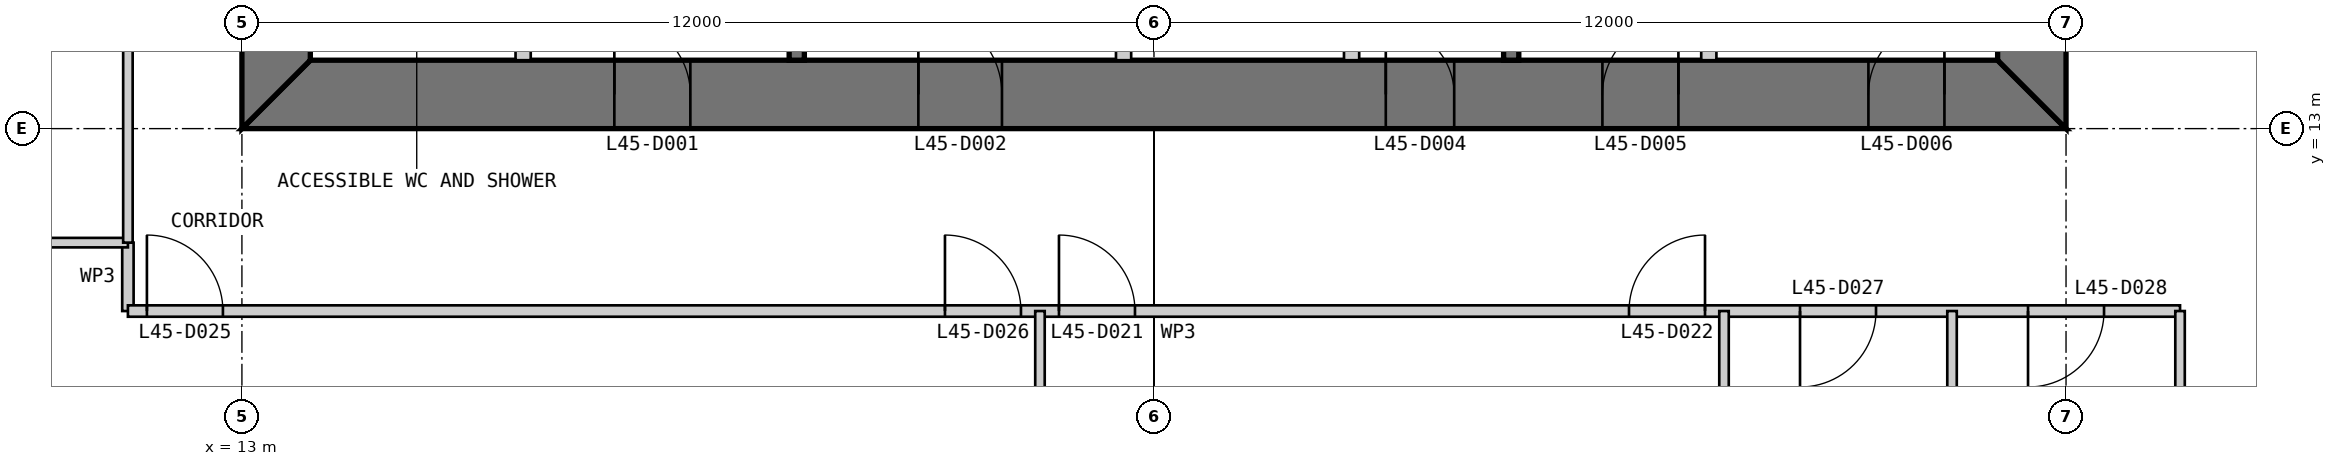
"""IFC4 building model, lengths in metres.
Left out: names, types, materials, properties, quantities, classifications, styles, units other than length and angle.
Written with IfcOpenShell. Run it as: python <this file> out.ifc"""

import sys

from ifc_helpers import new_model, si_unit, direction, frame, frame_2d, origin, place, context, subcontext, project, spatial, polyline, rectangle, outline, extrude, element, fill, save


model = new_model("IFC4")
c1 = context("Model", 3, precision=1e-05, world=origin(), true_north=direction((0.0, 1.0)))
c2 = subcontext(c1, "Body", "Model", "MODEL_VIEW")
j1 = project(units=[si_unit("LENGTHUNIT", "METRE"), si_unit("PLANEANGLEUNIT", "RADIAN")], contexts=[c1])
p1 = place(None, origin())
s1 = spatial("IfcSite", under=j1, at=p1, CompositionType="ELEMENT")
p2 = place(p1, origin())
s2 = spatial("IfcBuilding", under=s1, at=p2, CompositionType="ELEMENT")
p3 = place(p2, frame((0.0, 0.0, 193.8)))
s3 = spatial("IfcBuildingStorey", under=s2, at=p3, CompositionType="ELEMENT", Elevation=193.8)
p4 = place(p3, frame((13.0, 13.45, 0.0), z_axis=(0.0, 0.0, 1.0), x_axis=(1.0, 0.0, 0.0)))
e1 = element("IfcWall", 1, at=p4, inside=s3, PredefinedType="SHEAR", context=c2, shape_type="SweptSolid", body=[
    extrude(outline(polyline([(0.0, -0.45), (24.0, -0.45), (23.1, 0.45), (0.9, 0.45), (0.0, -0.45)])), origin(), (0.0, 0.0, 1.0), 4.0),
])
p5 = place(p4, frame((4.9, 0.0, 0.0)))
e2 = element("IfcOpeningElement", 2, at=p5, cuts=e1, PredefinedType="OPENING", context=c2, shape_type="SweptSolid", body=[
    extrude(rectangle(XDim=1.0, YDim=2.2, at=frame_2d((0.5, 1.1))), frame((0.0, 0.46, 0.0), z_axis=(0.0, -1.0, 0.0), x_axis=(1.0, 0.0, 0.0)), (0.0, 0.0, 1.0), 0.92),
])
p6 = place(p4, frame((8.9, 0.0, 0.0)))
e3 = element("IfcOpeningElement", 3, at=p6, cuts=e1, PredefinedType="OPENING", context=c2, shape_type="SweptSolid", body=[
    extrude(rectangle(XDim=1.1, YDim=2.2, at=frame_2d((0.55, 1.1))), frame((0.0, 0.46, 0.0), z_axis=(0.0, -1.0, 0.0), x_axis=(1.0, 0.0, 0.0)), (0.0, 0.0, 1.0), 0.92),
])
p7 = place(p4, frame((15.05, 0.0, 0.0)))
e4 = element("IfcOpeningElement", 4, at=p7, cuts=e1, PredefinedType="OPENING", context=c2, shape_type="SweptSolid", body=[
    extrude(rectangle(XDim=0.9, YDim=2.2, at=frame_2d((0.45, 1.1))), frame((0.0, 0.46, 0.0), z_axis=(0.0, -1.0, 0.0), x_axis=(1.0, 0.0, 0.0)), (0.0, 0.0, 1.0), 0.92),
])
p8 = place(p4, frame((17.9, 0.0, 0.0)))
e5 = element("IfcOpeningElement", 5, at=p8, cuts=e1, PredefinedType="OPENING", context=c2, shape_type="SweptSolid", body=[
    extrude(rectangle(XDim=1.0, YDim=2.2, at=frame_2d((0.5, 1.1))), frame((0.0, 0.46, 0.0), z_axis=(0.0, -1.0, 0.0), x_axis=(1.0, 0.0, 0.0)), (0.0, 0.0, 1.0), 0.92),
])
p9 = place(p4, frame((21.4, 0.0, 0.0)))
e6 = element("IfcOpeningElement", 6, at=p9, cuts=e1, PredefinedType="OPENING", context=c2, shape_type="SweptSolid", body=[
    extrude(rectangle(XDim=1.0, YDim=2.2, at=frame_2d((0.5, 1.1))), frame((0.0, 0.46, 0.0), z_axis=(0.0, -1.0, 0.0), x_axis=(1.0, 0.0, 0.0)), (0.0, 0.0, 1.0), 0.92),
])
p10 = place(p3, frame((36.55, 13.9, 0.0), z_axis=(0.0, 0.0, 1.0), x_axis=(0.0, 1.0, 0.0)))
e7 = element("IfcWall", 7, at=p10, inside=s3, PredefinedType="SHEAR", context=c2, shape_type="SweptSolid", body=[
    extrude(outline(polyline([(-0.9, -0.45), (23.1, -0.45), (22.2, 0.45), (0.0, 0.45), (-0.9, -0.45)])), origin(), (0.0, 0.0, 1.0), 4.0),
])
p11 = place(p10, frame((20.2, 0.0, 0.0)))
e8 = element("IfcOpeningElement", 8, at=p11, cuts=e7, PredefinedType="OPENING", context=c2, shape_type="SweptSolid", body=[
    extrude(rectangle(XDim=1.0, YDim=2.2, at=frame_2d((0.5, 1.1))), frame((0.0, 0.46, 0.0), z_axis=(0.0, -1.0, 0.0), x_axis=(1.0, 0.0, 0.0)), (0.0, 0.0, 1.0), 0.92),
])
p12 = place(p10, frame((17.25, 0.0, 0.0)))
e9 = element("IfcOpeningElement", 9, at=p12, cuts=e7, PredefinedType="OPENING", context=c2, shape_type="SweptSolid", body=[
    extrude(rectangle(XDim=0.9, YDim=2.2, at=frame_2d((0.45, 1.1))), frame((0.0, 0.46, 0.0), z_axis=(0.0, -1.0, 0.0), x_axis=(1.0, 0.0, 0.0)), (0.0, 0.0, 1.0), 0.92),
])
p13 = place(p3, frame((13.45, 36.1, 0.0), z_axis=(0.0, 0.0, 1.0), x_axis=(0.0, -1.0, 0.0)))
e10 = element("IfcWall", 10, at=p13, inside=s3, PredefinedType="SHEAR", context=c2, shape_type="SweptSolid", body=[
    extrude(outline(polyline([(-0.9, -0.45), (23.1, -0.45), (22.2, 0.45), (0.0, 0.45), (-0.9, -0.45)])), origin(), (0.0, 0.0, 1.0), 4.0),
])
p14 = place(p13, frame((20.2, 0.0, 0.0)))
e11 = element("IfcOpeningElement", 11, at=p14, cuts=e10, PredefinedType="OPENING", context=c2, shape_type="SweptSolid", body=[
    extrude(rectangle(XDim=1.0, YDim=2.2, at=frame_2d((0.5, 1.1))), frame((0.0, 0.46, 0.0), z_axis=(0.0, -1.0, 0.0), x_axis=(1.0, 0.0, 0.0)), (0.0, 0.0, 1.0), 0.92),
])
p15 = place(p13, frame((17.25, 0.0, 0.0)))
e12 = element("IfcOpeningElement", 12, at=p15, cuts=e10, PredefinedType="OPENING", context=c2, shape_type="SweptSolid", body=[
    extrude(rectangle(XDim=0.9, YDim=2.2, at=frame_2d((0.45, 1.1))), frame((0.0, 0.46, 0.0), z_axis=(0.0, -1.0, 0.0), x_axis=(1.0, 0.0, 0.0)), (0.0, 0.0, 1.0), 0.92),
])
p16 = place(p3, frame((16.7, 13.9, 0.0), z_axis=(0.0, 0.0, 1.0), x_axis=(0.0, 1.0, 0.0)))
e13 = element("IfcWall", 13, at=p16, inside=s3, PredefinedType="PARTITIONING", context=c2, shape_type="SweptSolid", body=[
    extrude(rectangle(XDim=16.1, YDim=0.2, at=frame_2d((8.05, 0.0))), origin(), (0.0, 0.0, 1.0), 3.8),
])
p17 = place(p16, frame((13.4, 0.0, 0.0)))
e14 = element("IfcOpeningElement", 14, at=p17, cuts=e13, PredefinedType="OPENING", context=c2, shape_type="SweptSolid", body=[
    extrude(rectangle(XDim=0.9, YDim=2.2, at=frame_2d((0.45, 1.1))), frame((0.0, 0.11, 0.0), z_axis=(0.0, -1.0, 0.0), x_axis=(1.0, 0.0, 0.0)), (0.0, 0.0, 1.0), 0.22),
])
p18 = place(p3, frame((20.3, 13.9, 0.0), z_axis=(0.0, 0.0, 1.0), x_axis=(0.0, 1.0, 0.0)))
e15 = element("IfcWall", 15, at=p18, inside=s3, PredefinedType="SOLIDWALL", context=c2, shape_type="SweptSolid", body=[
    extrude(rectangle(XDim=16.1, YDim=0.2, at=frame_2d((8.05, 0.0))), origin(), (0.0, 0.0, 1.0), 3.8),
])
p19 = place(p18, frame((8.4, 0.0, 0.0)))
e16 = element("IfcOpeningElement", 16, at=p19, cuts=e15, PredefinedType="OPENING", context=c2, shape_type="SweptSolid", body=[
    extrude(rectangle(XDim=0.9, YDim=2.2, at=frame_2d((0.45, 1.1))), frame((0.0, 0.11, 0.0), z_axis=(0.0, -1.0, 0.0), x_axis=(1.0, 0.0, 0.0)), (0.0, 0.0, 1.0), 0.22),
])
p20 = place(p18, frame((13.4, 0.0, 0.0)))
e17 = element("IfcOpeningElement", 17, at=p20, cuts=e15, PredefinedType="OPENING", context=c2, shape_type="SweptSolid", body=[
    extrude(rectangle(XDim=0.9, YDim=2.2, at=frame_2d((0.45, 1.1))), frame((0.0, 0.11, 0.0), z_axis=(0.0, -1.0, 0.0), x_axis=(1.0, 0.0, 0.0)), (0.0, 0.0, 1.0), 0.22),
])
p21 = place(p3, frame((24.6, 13.9, 0.0), z_axis=(0.0, 0.0, 1.0), x_axis=(0.0, 1.0, 0.0)))
e18 = element("IfcWall", 18, at=p21, inside=s3, PredefinedType="PARTITIONING", context=c2, shape_type="SweptSolid", body=[
    extrude(rectangle(XDim=3.3, YDim=0.2, at=frame_2d((1.65, 0.0))), origin(), (0.0, 0.0, 1.0), 3.8),
])
p22 = place(p21, frame((0.9, 0.0, 0.0)))
e19 = element("IfcOpeningElement", 19, at=p22, cuts=e18, PredefinedType="OPENING", context=c2, shape_type="SweptSolid", body=[
    extrude(rectangle(XDim=1.1, YDim=2.2, at=frame_2d((0.55, 1.1))), frame((0.0, 0.11, 0.0), z_axis=(0.0, -1.0, 0.0), x_axis=(1.0, 0.0, 0.0)), (0.0, 0.0, 1.0), 0.22),
])
p23 = place(p3, frame((27.6, 13.9, 0.0), z_axis=(0.0, 0.0, 1.0), x_axis=(0.0, 1.0, 0.0)))
e20 = element("IfcWall", 20, at=p23, inside=s3, PredefinedType="PARTITIONING", context=c2, shape_type="SweptSolid", body=[
    extrude(rectangle(XDim=3.3, YDim=0.2, at=frame_2d((1.65, 0.0))), origin(), (0.0, 0.0, 1.0), 3.8),
])
p24 = place(p3, frame((29.7, 13.9, 0.0), z_axis=(0.0, 0.0, 1.0), x_axis=(0.0, 1.0, 0.0)))
e21 = element("IfcWall", 21, at=p24, inside=s3, PredefinedType="SOLIDWALL", context=c2, shape_type="SweptSolid", body=[
    extrude(rectangle(XDim=6.1, YDim=0.2, at=frame_2d((3.05, 0.0))), origin(), (0.0, 0.0, 1.0), 3.8),
])
p25 = place(p3, frame((32.3, 13.9, 0.0), z_axis=(0.0, 0.0, 1.0), x_axis=(0.0, 1.0, 0.0)))
e22 = element("IfcWall", 22, at=p25, inside=s3, PredefinedType="PARTITIONING", context=c2, shape_type="SweptSolid", body=[
    extrude(rectangle(XDim=6.1, YDim=0.2, at=frame_2d((3.05, 0.0))), origin(), (0.0, 0.0, 1.0), 3.8),
])
p26 = place(p3, frame((11.5, 11.5, 0.0), z_axis=(0.0, 0.0, 1.0), x_axis=(0.0, -1.0, 0.0)))
e23 = element("IfcWall", 23, at=p26, inside=s3, PredefinedType="PARTITIONING", context=c2, shape_type="SweptSolid", body=[
    extrude(rectangle(XDim=0.9, YDim=0.15, at=frame_2d((0.45, 0.0))), origin(), (0.0, 0.0, 1.0), 3.85),
])
p27 = place(p3, frame((11.5, 10.6, 0.0), z_axis=(0.0, 0.0, 1.0), x_axis=(1.0, 0.0, 0.0)))
e24 = element("IfcWall", 24, at=p27, inside=s3, PredefinedType="PARTITIONING", context=c2, shape_type="SweptSolid", body=[
    extrude(rectangle(XDim=27.0, YDim=0.15, at=frame_2d((13.5, 0.0))), origin(), (0.0, 0.0, 1.0), 3.85),
])
p28 = place(p27, frame((12.25, 0.0, 0.0)))
e25 = element("IfcOpeningElement", 25, at=p28, cuts=e24, PredefinedType="OPENING", context=c2, shape_type="SweptSolid", body=[
    extrude(rectangle(XDim=1.0, YDim=2.2, at=frame_2d((0.5, 1.1))), frame((0.0, 0.085, 0.0), z_axis=(0.0, -1.0, 0.0), x_axis=(1.0, 0.0, 0.0)), (0.0, 0.0, 1.0), 0.17),
])
p29 = place(p27, frame((19.75, 0.0, 0.0)))
e26 = element("IfcOpeningElement", 26, at=p29, cuts=e24, PredefinedType="OPENING", context=c2, shape_type="SweptSolid", body=[
    extrude(rectangle(XDim=1.0, YDim=2.2, at=frame_2d((0.5, 1.1))), frame((0.0, 0.085, 0.0), z_axis=(0.0, -1.0, 0.0), x_axis=(1.0, 0.0, 0.0)), (0.0, 0.0, 1.0), 0.17),
])
p30 = place(p27, frame((0.25, 0.0, 0.0)))
e27 = element("IfcOpeningElement", 27, at=p30, cuts=e24, PredefinedType="OPENING", context=c2, shape_type="SweptSolid", body=[
    extrude(rectangle(XDim=1.0, YDim=2.2, at=frame_2d((0.5, 1.1))), frame((0.0, 0.085, 0.0), z_axis=(0.0, -1.0, 0.0), x_axis=(1.0, 0.0, 0.0)), (0.0, 0.0, 1.0), 0.17),
])
p31 = place(p27, frame((10.75, 0.0, 0.0)))
e28 = element("IfcOpeningElement", 28, at=p31, cuts=e24, PredefinedType="OPENING", context=c2, shape_type="SweptSolid", body=[
    extrude(rectangle(XDim=1.0, YDim=2.2, at=frame_2d((0.5, 1.1))), frame((0.0, 0.085, 0.0), z_axis=(0.0, -1.0, 0.0), x_axis=(1.0, 0.0, 0.0)), (0.0, 0.0, 1.0), 0.17),
])
p32 = place(p27, frame((22.0, 0.0, 0.0)))
e29 = element("IfcOpeningElement", 29, at=p32, cuts=e24, PredefinedType="OPENING", context=c2, shape_type="SweptSolid", body=[
    extrude(rectangle(XDim=1.0, YDim=2.2, at=frame_2d((0.5, 1.1))), frame((0.0, 0.085, 0.0), z_axis=(0.0, -1.0, 0.0), x_axis=(1.0, 0.0, 0.0)), (0.0, 0.0, 1.0), 0.17),
])
p33 = place(p27, frame((25.0, 0.0, 0.0)))
e30 = element("IfcOpeningElement", 30, at=p33, cuts=e24, PredefinedType="OPENING", context=c2, shape_type="SweptSolid", body=[
    extrude(rectangle(XDim=1.0, YDim=2.2, at=frame_2d((0.5, 1.1))), frame((0.0, 0.085, 0.0), z_axis=(0.0, -1.0, 0.0), x_axis=(1.0, 0.0, 0.0)), (0.0, 0.0, 1.0), 0.17),
])
p34 = place(p3, frame((0.15, 11.5, 0.0), z_axis=(0.0, 0.0, 1.0), x_axis=(1.0, 0.0, 0.0)))
e31 = element("IfcWall", 31, at=p34, inside=s3, PredefinedType="PARTITIONING", context=c2, shape_type="SweptSolid", body=[
    extrude(rectangle(XDim=11.35, YDim=0.125, at=frame_2d((5.675, 0.0))), origin(), (0.0, 0.0, 1.0), 3.85),
])
p35 = place(p3, frame((23.5, 5.5, 0.0), z_axis=(0.0, 0.0, 1.0), x_axis=(0.0, 1.0, 0.0)))
e32 = element("IfcWall", 32, at=p35, inside=s3, PredefinedType="PARTITIONING", context=c2, shape_type="SweptSolid", body=[
    extrude(rectangle(XDim=5.1, YDim=0.125, at=frame_2d((2.55, 0.0))), origin(), (0.0, 0.0, 1.0), 3.85),
])
p36 = place(p3, frame((32.5, 0.15, 0.0), z_axis=(0.0, 0.0, 1.0), x_axis=(0.0, 1.0, 0.0)))
e33 = element("IfcWall", 33, at=p36, inside=s3, PredefinedType="PARTITIONING", context=c2, shape_type="SweptSolid", body=[
    extrude(rectangle(XDim=10.45, YDim=0.125, at=frame_2d((5.225, 0.0))), origin(), (0.0, 0.0, 1.0), 3.85),
])
p37 = place(p3, frame((35.5, 5.5, 0.0), z_axis=(0.0, 0.0, 1.0), x_axis=(0.0, 1.0, 0.0)))
e34 = element("IfcWall", 34, at=p37, inside=s3, PredefinedType="PARTITIONING", context=c2, shape_type="SweptSolid", body=[
    extrude(rectangle(XDim=5.1, YDim=0.125, at=frame_2d((2.55, 0.0))), origin(), (0.0, 0.0, 1.0), 3.85),
])
p38 = place(p3, frame((38.5, 0.15, 0.0), z_axis=(0.0, 0.0, 1.0), x_axis=(0.0, 1.0, 0.0)))
e35 = element("IfcWall", 35, at=p38, inside=s3, PredefinedType="PARTITIONING", context=c2, shape_type="SweptSolid", body=[
    extrude(rectangle(XDim=10.45, YDim=0.125, at=frame_2d((5.225, 0.0))), origin(), (0.0, 0.0, 1.0), 3.85),
])
p39 = place(p3, frame((11.5, 14.5, 0.0), z_axis=(0.0, 0.0, 1.0), x_axis=(0.0, -1.0, 0.0)))
e36 = element("IfcWall", 36, at=p39, inside=s3, PredefinedType="PARTITIONING", context=c2, shape_type="SweptSolid", body=[
    extrude(rectangle(XDim=3.0, YDim=0.125, at=frame_2d((1.5, 0.0))), origin(), (0.0, 0.0, 1.0), 3.85),
])
p40 = place(p5, origin())
e37 = element("IfcDoor", 37, at=p40, inside=s3, OperationType="SINGLE_SWING_LEFT", PredefinedType="DOOR", context=c2, shape_type="SweptSolid", body=[
    extrude(rectangle(XDim=1.0, YDim=2.2, at=frame_2d((0.5, 1.1))), frame((0.0, 0.025, 0.0), z_axis=(0.0, -1.0, 0.0), x_axis=(1.0, 0.0, 0.0)), (0.0, 0.0, 1.0), 0.05),
    extrude(outline(polyline([(0.0, 0.0), (0.04, 0.0), (0.04, 2.16), (0.96, 2.16), (0.96, 0.0), (1.0, 0.0), (1.0, 2.2), (0.0, 2.2), (0.0, 0.0)])), frame((0.0, 0.3, 0.0), z_axis=(0.0, -1.0, 0.0), x_axis=(1.0, 0.0, 0.0)), (0.0, 0.0, 1.0), 0.6),
])
fill(e2, e37)
p41 = place(p6, origin())
e38 = element("IfcDoor", 38, at=p41, inside=s3, OperationType="SINGLE_SWING_LEFT", PredefinedType="DOOR", context=c2, shape_type="SweptSolid", body=[
    extrude(rectangle(XDim=1.1, YDim=2.2, at=frame_2d((0.55, 1.1))), frame((0.0, 0.025, 0.0), z_axis=(0.0, -1.0, 0.0), x_axis=(1.0, 0.0, 0.0)), (0.0, 0.0, 1.0), 0.05),
    extrude(outline(polyline([(0.0, 0.0), (0.04, 0.0), (0.04, 2.16), (1.06, 2.16), (1.06, 0.0), (1.1, 0.0), (1.1, 2.2), (0.0, 2.2), (0.0, 0.0)])), frame((0.0, 0.3, 0.0), z_axis=(0.0, -1.0, 0.0), x_axis=(1.0, 0.0, 0.0)), (0.0, 0.0, 1.0), 0.6),
])
fill(e3, e38)
p42 = place(p7, origin())
e39 = element("IfcDoor", 39, at=p42, inside=s3, OperationType="SINGLE_SWING_LEFT", PredefinedType="DOOR", context=c2, shape_type="SweptSolid", body=[
    extrude(rectangle(XDim=0.9, YDim=2.2, at=frame_2d((0.45, 1.1))), frame((0.0, 0.025, 0.0), z_axis=(0.0, -1.0, 0.0), x_axis=(1.0, 0.0, 0.0)), (0.0, 0.0, 1.0), 0.05),
    extrude(outline(polyline([(0.0, 0.0), (0.04, 0.0), (0.04, 2.16), (0.86, 2.16), (0.86, 0.0), (0.9, 0.0), (0.9, 2.2), (0.0, 2.2), (0.0, 0.0)])), frame((0.0, 0.3, 0.0), z_axis=(0.0, -1.0, 0.0), x_axis=(1.0, 0.0, 0.0)), (0.0, 0.0, 1.0), 0.6),
])
fill(e4, e39)
p43 = place(p8, origin())
e40 = element("IfcDoor", 40, at=p43, inside=s3, OperationType="SINGLE_SWING_RIGHT", PredefinedType="DOOR", context=c2, shape_type="SweptSolid", body=[
    extrude(rectangle(XDim=1.0, YDim=2.2, at=frame_2d((0.5, 1.1))), frame((0.0, 0.025, 0.0), z_axis=(0.0, -1.0, 0.0), x_axis=(1.0, 0.0, 0.0)), (0.0, 0.0, 1.0), 0.05),
    extrude(outline(polyline([(0.0, 0.0), (0.04, 0.0), (0.04, 2.16), (0.96, 2.16), (0.96, 0.0), (1.0, 0.0), (1.0, 2.2), (0.0, 2.2), (0.0, 0.0)])), frame((0.0, 0.3, 0.0), z_axis=(0.0, -1.0, 0.0), x_axis=(1.0, 0.0, 0.0)), (0.0, 0.0, 1.0), 0.6),
])
fill(e5, e40)
p44 = place(p9, origin())
e41 = element("IfcDoor", 41, at=p44, inside=s3, OperationType="SINGLE_SWING_RIGHT", PredefinedType="DOOR", context=c2, shape_type="SweptSolid", body=[
    extrude(rectangle(XDim=1.0, YDim=2.2, at=frame_2d((0.5, 1.1))), frame((0.0, 0.025, 0.0), z_axis=(0.0, -1.0, 0.0), x_axis=(1.0, 0.0, 0.0)), (0.0, 0.0, 1.0), 0.05),
    extrude(outline(polyline([(0.0, 0.0), (0.04, 0.0), (0.04, 2.16), (0.96, 2.16), (0.96, 0.0), (1.0, 0.0), (1.0, 2.2), (0.0, 2.2), (0.0, 0.0)])), frame((0.0, 0.3, 0.0), z_axis=(0.0, -1.0, 0.0), x_axis=(1.0, 0.0, 0.0)), (0.0, 0.0, 1.0), 0.6),
])
fill(e6, e41)
p45 = place(p28, origin())
e42 = element("IfcDoor", 42, at=p45, inside=s3, OperationType="SINGLE_SWING_LEFT", PredefinedType="DOOR", context=c2, shape_type="SweptSolid", body=[
    extrude(rectangle(XDim=1.0, YDim=2.2, at=frame_2d((0.5, 1.1))), frame((0.0, 0.025, 0.0), z_axis=(0.0, -1.0, 0.0), x_axis=(1.0, 0.0, 0.0)), (0.0, 0.0, 1.0), 0.05),
])
fill(e25, e42)
p46 = place(p29, origin())
e43 = element("IfcDoor", 43, at=p46, inside=s3, OperationType="SINGLE_SWING_RIGHT", PredefinedType="DOOR", context=c2, shape_type="SweptSolid", body=[
    extrude(rectangle(XDim=1.0, YDim=2.2, at=frame_2d((0.5, 1.1))), frame((0.0, 0.025, 0.0), z_axis=(0.0, -1.0, 0.0), x_axis=(1.0, 0.0, 0.0)), (0.0, 0.0, 1.0), 0.05),
])
fill(e26, e43)
p47 = place(p30, origin())
e44 = element("IfcDoor", 44, at=p47, inside=s3, OperationType="SINGLE_SWING_LEFT", PredefinedType="DOOR", context=c2, shape_type="SweptSolid", body=[
    extrude(rectangle(XDim=1.0, YDim=2.2, at=frame_2d((0.5, 1.1))), frame((0.0, 0.025, 0.0), z_axis=(0.0, -1.0, 0.0), x_axis=(1.0, 0.0, 0.0)), (0.0, 0.0, 1.0), 0.05),
])
fill(e27, e44)
p48 = place(p31, origin())
e45 = element("IfcDoor", 45, at=p48, inside=s3, OperationType="SINGLE_SWING_LEFT", PredefinedType="DOOR", context=c2, shape_type="SweptSolid", body=[
    extrude(rectangle(XDim=1.0, YDim=2.2, at=frame_2d((0.5, 1.1))), frame((0.0, 0.025, 0.0), z_axis=(0.0, -1.0, 0.0), x_axis=(1.0, 0.0, 0.0)), (0.0, 0.0, 1.0), 0.05),
])
fill(e28, e45)
p49 = place(p32, frame((1.0, 0.0, 0.0), z_axis=(0.0, 0.0, 1.0), x_axis=(-1.0, 0.0, 0.0)))
e46 = element("IfcDoor", 46, at=p49, inside=s3, OperationType="SINGLE_SWING_RIGHT", PredefinedType="DOOR", context=c2, shape_type="SweptSolid", body=[
    extrude(rectangle(XDim=1.0, YDim=2.2, at=frame_2d((0.5, 1.1))), frame((0.0, 0.025, 0.0), z_axis=(0.0, -1.0, 0.0), x_axis=(1.0, 0.0, 0.0)), (0.0, 0.0, 1.0), 0.05),
])
fill(e29, e46)
p50 = place(p33, frame((1.0, 0.0, 0.0), z_axis=(0.0, 0.0, 1.0), x_axis=(-1.0, 0.0, 0.0)))
e47 = element("IfcDoor", 47, at=p50, inside=s3, OperationType="SINGLE_SWING_RIGHT", PredefinedType="DOOR", context=c2, shape_type="SweptSolid", body=[
    extrude(rectangle(XDim=1.0, YDim=2.2, at=frame_2d((0.5, 1.1))), frame((0.0, 0.025, 0.0), z_axis=(0.0, -1.0, 0.0), x_axis=(1.0, 0.0, 0.0)), (0.0, 0.0, 1.0), 0.05),
])
fill(e30, e47)
save(model, sys.argv[1])
